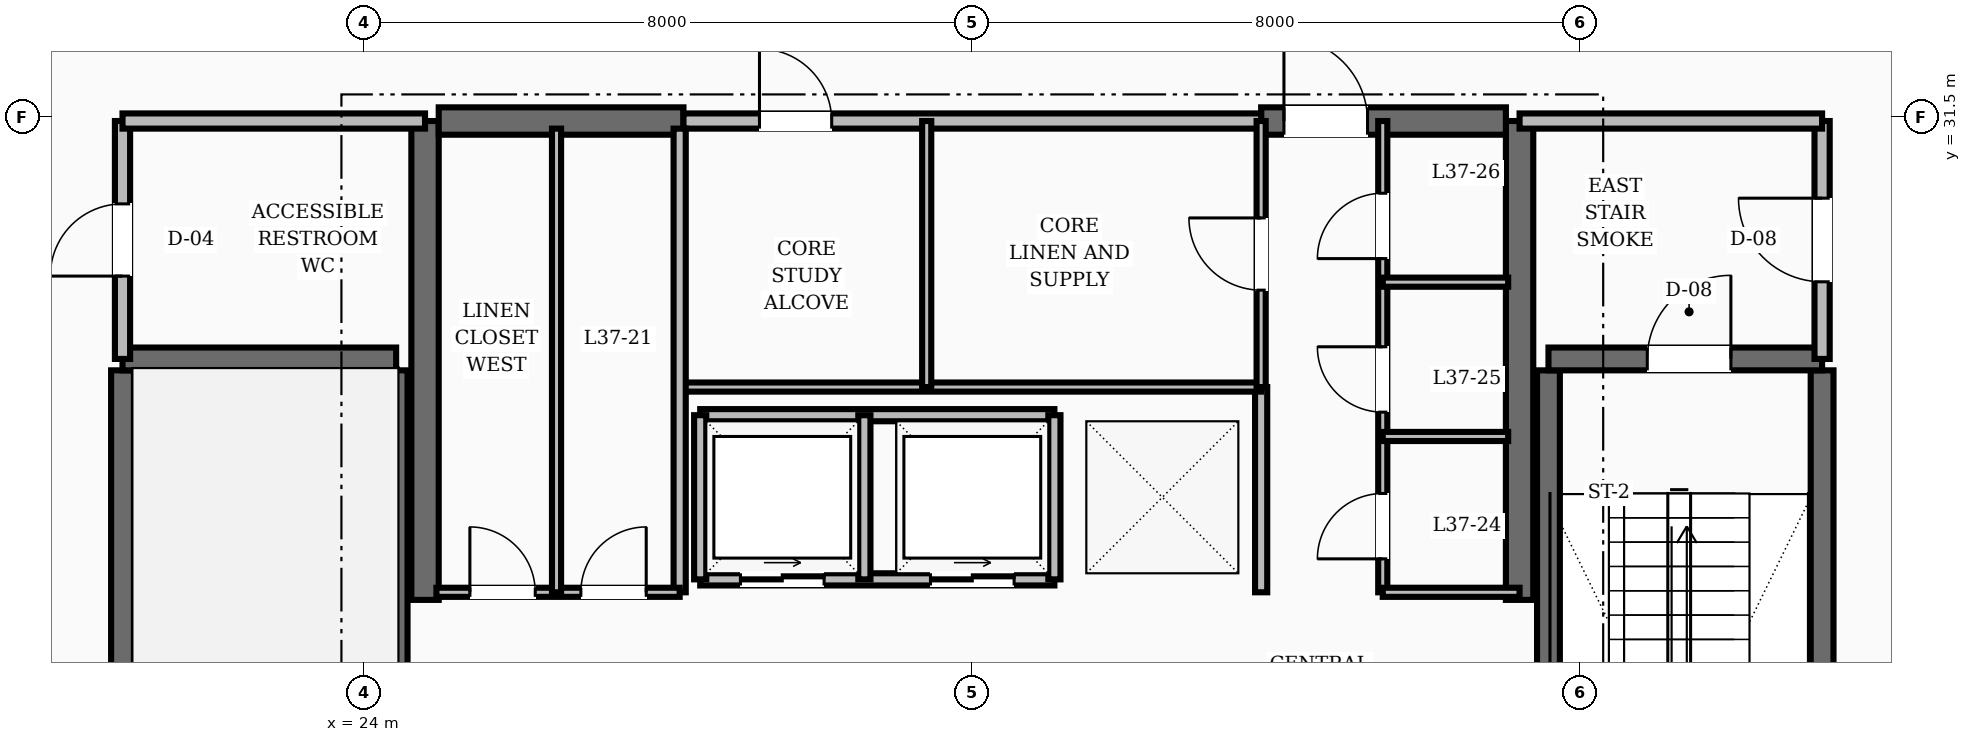
"""IFC4 building model, lengths in metres.
Left out: names, types, materials, properties, quantities, classifications, styles, units other than length and angle.
Written with IfcOpenShell. Run it as: python <this file> out.ifc"""

import sys

from ifc_helpers import new_model, si_unit, direction, frame, frame_2d, origin, place, context, subcontext, project, spatial, rectangle, extrude, element, fill, save


model = new_model("IFC4")
c1 = context("Model", 3, precision=1e-05, world=origin(), true_north=direction((0.0, 1.0)))
c2 = subcontext(c1, "Body", "Model", "MODEL_VIEW")
j1 = project(units=[si_unit("LENGTHUNIT", "METRE"), si_unit("PLANEANGLEUNIT", "RADIAN")], contexts=[c1])
p1 = place(None, origin())
s1 = spatial("IfcSite", under=j1, at=p1, CompositionType="ELEMENT")
p2 = place(p1, origin())
s2 = spatial("IfcBuilding", under=s1, at=p2, CompositionType="ELEMENT")
p3 = place(p2, frame((0.0, 0.0, 146.0)))
s3 = spatial("IfcBuildingStorey", under=s2, at=p3, CompositionType="ELEMENT", Elevation=146.0)
for number, where, z_axis, x_axis in (
    (1, (24.8, 25.15, 0.0), (0.0, 0.0, 1.0), (0.0, 1.0, 0.0)),
    (2, (39.2, 25.15, 0.0), (0.0, 0.0, 1.0), (0.0, 1.0, 0.0)),
):
    element("IfcWall", number, at=place(p3, frame(where, z_axis=z_axis, x_axis=x_axis)), inside=s3, PredefinedType="SHEAR", context=c2, shape_type="SweptSolid", body=[
        extrude(rectangle(XDim=6.3, YDim=0.36, at=frame_2d((3.15, 0.0))), origin(), (0.0, 0.0, 1.0), 3.6),
    ])
p4 = place(p3, frame((24.98, 31.45, 0.0), z_axis=(0.0, 0.0, 1.0), x_axis=(1.0, 0.0, 0.0)))
e3 = element("IfcWall", 3, at=p4, inside=s3, PredefinedType="SHEAR", context=c2, shape_type="SweptSolid", body=[
    extrude(rectangle(XDim=3.22, YDim=0.36, at=frame_2d((1.61, 0.0))), origin(), (0.0, 0.0, 1.0), 3.6),
])
p5 = place(p3, frame((35.8, 31.45, 0.0), z_axis=(0.0, 0.0, 1.0), x_axis=(1.0, 0.0, 0.0)))
e4 = element("IfcWall", 4, at=p5, inside=s3, PredefinedType="SHEAR", context=c2, shape_type="SweptSolid", body=[
    extrude(rectangle(XDim=3.22, YDim=0.36, at=frame_2d((1.61, 0.0))), origin(), (0.0, 0.0, 1.0), 3.6),
])
p6 = place(p5, frame((0.3, 0.0, 0.0)))
e5 = element("IfcOpeningElement", 5, at=p6, cuts=e4, PredefinedType="OPENING", context=c2, shape_type="SweptSolid", body=[
    extrude(rectangle(XDim=1.1, YDim=2.1, at=frame_2d((0.55, 1.05))), frame((0.0, 0.19, 0.0), z_axis=(0.0, -1.0, 0.0), x_axis=(1.0, 0.0, 0.0)), (0.0, 0.0, 1.0), 0.38),
])
for number, where, z_axis, x_axis in (
    (6, (20.82, 19.43, 0.0), (0.0, 0.0, 1.0), (0.0, 1.0, 0.0)),
    (7, (24.42, 19.43, 0.0), (0.0, 0.0, 1.0), (0.0, 1.0, 0.0)),
):
    element("IfcWall", number, at=place(p3, frame(where, z_axis=z_axis, x_axis=x_axis)), inside=s3, PredefinedType="SHEAR", context=c2, shape_type="SweptSolid", body=[
        extrude(rectangle(XDim=8.74, YDim=0.3, at=frame_2d((4.37, 0.0))), origin(), (0.0, 0.0, 1.0), 3.6),
    ])
p7 = place(p3, frame((20.82, 28.32, 0.0), z_axis=(0.0, 0.0, 1.0), x_axis=(1.0, 0.0, 0.0)))
e8 = element("IfcWall", 8, at=p7, inside=s3, PredefinedType="SHEAR", context=c2, shape_type="SweptSolid", body=[
    extrude(rectangle(XDim=3.6, YDim=0.3, at=frame_2d((1.8, 0.0))), origin(), (0.0, 0.0, 1.0), 3.6),
])
for number, where, z_axis, x_axis in (
    (9, (43.18, 19.43, 0.0), (0.0, 0.0, 1.0), (0.0, 1.0, 0.0)),
    (10, (39.58, 19.43, 0.0), (0.0, 0.0, 1.0), (0.0, 1.0, 0.0)),
):
    element("IfcWall", number, at=place(p3, frame(where, z_axis=z_axis, x_axis=x_axis)), inside=s3, PredefinedType="SHEAR", context=c2, shape_type="SweptSolid", body=[
        extrude(rectangle(XDim=8.74, YDim=0.3, at=frame_2d((4.37, 0.0))), origin(), (0.0, 0.0, 1.0), 3.6),
    ])
p8 = place(p3, frame((39.58, 28.32, 0.0), z_axis=(0.0, 0.0, 1.0), x_axis=(1.0, 0.0, 0.0)))
e11 = element("IfcWall", 11, at=p8, inside=s3, PredefinedType="SHEAR", context=c2, shape_type="SweptSolid", body=[
    extrude(rectangle(XDim=3.6, YDim=0.3, at=frame_2d((1.8, 0.0))), origin(), (0.0, 0.0, 1.0), 3.6),
])
p9 = place(p8, frame((1.3, 0.0, 0.0)))
e12 = element("IfcOpeningElement", 12, at=p9, cuts=e11, PredefinedType="OPENING", context=c2, shape_type="SweptSolid", body=[
    extrude(rectangle(XDim=1.1, YDim=2.1, at=frame_2d((0.55, 1.05))), frame((0.0, 0.16, 0.0), z_axis=(0.0, -1.0, 0.0), x_axis=(1.0, 0.0, 0.0)), (0.0, 0.0, 1.0), 0.32),
])
p10 = place(p3, frame((43.18, 28.32, 0.0), z_axis=(0.0, 0.0, 1.0), x_axis=(0.0, 1.0, 0.0)))
e13 = element("IfcWall", 13, at=p10, inside=s3, PredefinedType="SOLIDWALL", context=c2, shape_type="SweptSolid", body=[
    extrude(rectangle(XDim=3.13, YDim=0.2, at=frame_2d((1.565, 0.0))), origin(), (0.0, 0.0, 1.0), 2.8),
])
p11 = place(p10, frame((1.015, 0.0, 0.0)))
e14 = element("IfcOpeningElement", 14, at=p11, cuts=e13, PredefinedType="OPENING", context=c2, shape_type="SweptSolid", body=[
    extrude(rectangle(XDim=1.1, YDim=2.1, at=frame_2d((0.55, 1.05))), frame((0.0, 0.11, 0.0), z_axis=(0.0, -1.0, 0.0), x_axis=(1.0, 0.0, 0.0)), (0.0, 0.0, 1.0), 0.22),
])
p12 = place(p3, frame((39.2, 31.45, 0.0), z_axis=(0.0, 0.0, 1.0), x_axis=(1.0, 0.0, 0.0)))
e15 = element("IfcWall", 15, at=p12, inside=s3, PredefinedType="SOLIDWALL", context=c2, shape_type="SweptSolid", body=[
    extrude(rectangle(XDim=3.98, YDim=0.2, at=frame_2d((1.99, 0.0))), origin(), (0.0, 0.0, 1.0), 2.8),
])
p13 = place(p3, frame((20.82, 28.32, 0.0), z_axis=(0.0, 0.0, 1.0), x_axis=(0.0, 1.0, 0.0)))
e16 = element("IfcWall", 16, at=p13, inside=s3, PredefinedType="SOLIDWALL", context=c2, shape_type="SweptSolid", body=[
    extrude(rectangle(XDim=3.13, YDim=0.2, at=frame_2d((1.565, 0.0))), origin(), (0.0, 0.0, 1.0), 2.8),
])
p14 = place(p13, frame((1.09, 0.0, 0.0)))
e17 = element("IfcOpeningElement", 17, at=p14, cuts=e16, PredefinedType="OPENING", context=c2, shape_type="SweptSolid", body=[
    extrude(rectangle(XDim=0.95, YDim=2.1, at=frame_2d((0.475, 1.05))), frame((0.0, 0.11, 0.0), z_axis=(0.0, -1.0, 0.0), x_axis=(1.0, 0.0, 0.0)), (0.0, 0.0, 1.0), 0.22),
])
p15 = place(p3, frame((20.82, 31.45, 0.0), z_axis=(0.0, 0.0, 1.0), x_axis=(1.0, 0.0, 0.0)))
e18 = element("IfcWall", 18, at=p15, inside=s3, PredefinedType="SOLIDWALL", context=c2, shape_type="SweptSolid", body=[
    extrude(rectangle(XDim=3.98, YDim=0.2, at=frame_2d((1.99, 0.0))), origin(), (0.0, 0.0, 1.0), 2.8),
])
p16 = place(p3, frame((35.8, 25.25, 0.0), z_axis=(0.0, 0.0, 1.0), x_axis=(0.0, 1.0, 0.0)))
e19 = element("IfcWall", 19, at=p16, inside=s3, PredefinedType="SOLIDWALL", context=c2, shape_type="SweptSolid", body=[
    extrude(rectangle(XDim=2.7, YDim=0.16, at=frame_2d((1.35, 0.0))), origin(), (0.0, 0.0, 1.0), 2.8),
])
p17 = place(p3, frame((28.42, 25.42, 0.0), z_axis=(0.0, 0.0, 1.0), x_axis=(1.0, 0.0, 0.0)))
e20 = element("IfcWall", 20, at=p17, inside=s3, PredefinedType="SOLIDWALL", context=c2, shape_type="SweptSolid", body=[
    extrude(rectangle(XDim=4.66, YDim=0.16, at=frame_2d((2.33, 0.0))), origin(), (0.0, 0.0, 1.0), 2.8),
])
p18 = place(p17, frame((0.53, 0.0, 0.0)))
e21 = element("IfcOpeningElement", 21, at=p18, cuts=e20, PredefinedType="OPENING", context=c2, shape_type="SweptSolid", body=[
    extrude(rectangle(XDim=1.1, YDim=2.15, at=frame_2d((0.55, 1.075))), frame((0.0, 0.09, 0.0), z_axis=(0.0, -1.0, 0.0), x_axis=(1.0, 0.0, 0.0)), (0.0, 0.0, 1.0), 0.18),
])
p19 = place(p17, frame((3.03, 0.0, 0.0)))
e22 = element("IfcOpeningElement", 22, at=p19, cuts=e20, PredefinedType="OPENING", context=c2, shape_type="SweptSolid", body=[
    extrude(rectangle(XDim=1.1, YDim=2.15, at=frame_2d((0.55, 1.075))), frame((0.0, 0.09, 0.0), z_axis=(0.0, -1.0, 0.0), x_axis=(1.0, 0.0, 0.0)), (0.0, 0.0, 1.0), 0.18),
])
p20 = place(p3, frame((28.42, 27.58, 0.0), z_axis=(0.0, 0.0, 1.0), x_axis=(1.0, 0.0, 0.0)))
e23 = element("IfcWall", 23, at=p20, inside=s3, PredefinedType="SOLIDWALL", context=c2, shape_type="SweptSolid", body=[
    extrude(rectangle(XDim=4.66, YDim=0.16, at=frame_2d((2.33, 0.0))), origin(), (0.0, 0.0, 1.0), 2.8),
])
for number, where, z_axis, x_axis in (
    (24, (28.42, 25.42, 0.0), (0.0, 0.0, 1.0), (0.0, 1.0, 0.0)),
    (25, (30.58, 25.42, 0.0), (0.0, 0.0, 1.0), (0.0, 1.0, 0.0)),
    (26, (33.08, 25.42, 0.0), (0.0, 0.0, 1.0), (0.0, 1.0, 0.0)),
):
    element("IfcWall", number, at=place(p3, frame(where, z_axis=z_axis, x_axis=x_axis)), inside=s3, PredefinedType="SOLIDWALL", context=c2, shape_type="SweptSolid", body=[
        extrude(rectangle(XDim=2.16, YDim=0.16, at=frame_2d((1.08, 0.0))), origin(), (0.0, 0.0, 1.0), 2.8),
    ])
p21 = place(p3, frame((28.2, 31.45, 0.0), z_axis=(0.0, 0.0, 1.0), x_axis=(1.0, 0.0, 0.0)))
e27 = element("IfcWall", 27, at=p21, inside=s3, PredefinedType="SOLIDWALL", context=c2, shape_type="SweptSolid", body=[
    extrude(rectangle(XDim=7.6, YDim=0.2, at=frame_2d((3.8, 0.0))), origin(), (0.0, 0.0, 1.0), 2.8),
])
p22 = place(p21, frame((1.0, 0.0, 0.0)))
e28 = element("IfcOpeningElement", 28, at=p22, cuts=e27, PredefinedType="OPENING", context=c2, shape_type="SweptSolid", body=[
    extrude(rectangle(XDim=0.95, YDim=2.1, at=frame_2d((0.475, 1.05))), frame((0.0, 0.11, 0.0), z_axis=(0.0, -1.0, 0.0), x_axis=(1.0, 0.0, 0.0)), (0.0, 0.0, 1.0), 0.22),
])
p23 = place(p3, frame((28.2, 27.95, 0.0), z_axis=(0.0, 0.0, 1.0), x_axis=(1.0, 0.0, 0.0)))
e29 = element("IfcWall", 29, at=p23, inside=s3, PredefinedType="PARTITIONING", context=c2, shape_type="SweptSolid", body=[
    extrude(rectangle(XDim=7.6, YDim=0.12, at=frame_2d((3.8, 0.0))), origin(), (0.0, 0.0, 1.0), 2.8),
])
p24 = place(p3, frame((35.8, 27.95, 0.0), z_axis=(0.0, 0.0, 1.0), x_axis=(0.0, 1.0, 0.0)))
e30 = element("IfcWall", 30, at=p24, inside=s3, PredefinedType="PARTITIONING", context=c2, shape_type="SweptSolid", body=[
    extrude(rectangle(XDim=3.5, YDim=0.12, at=frame_2d((1.75, 0.0))), origin(), (0.0, 0.0, 1.0), 2.8),
])
p25 = place(p24, frame((1.275, 0.0, 0.0)))
e31 = element("IfcOpeningElement", 31, at=p25, cuts=e30, PredefinedType="OPENING", context=c2, shape_type="SweptSolid", body=[
    extrude(rectangle(XDim=0.95, YDim=2.1, at=frame_2d((0.475, 1.05))), frame((0.0, 0.07, 0.0), z_axis=(0.0, -1.0, 0.0), x_axis=(1.0, 0.0, 0.0)), (0.0, 0.0, 1.0), 0.14),
])
p26 = place(p3, frame((31.4, 27.95, 0.0), z_axis=(0.0, 0.0, 1.0), x_axis=(0.0, 1.0, 0.0)))
e32 = element("IfcWall", 32, at=p26, inside=s3, PredefinedType="PARTITIONING", context=c2, shape_type="SweptSolid", body=[
    extrude(rectangle(XDim=3.5, YDim=0.12, at=frame_2d((1.75, 0.0))), origin(), (0.0, 0.0, 1.0), 2.8),
])
p27 = place(p3, frame((28.15, 25.25, 0.0), z_axis=(0.0, 0.0, 1.0), x_axis=(0.0, 1.0, 0.0)))
e33 = element("IfcWall", 33, at=p27, inside=s3, PredefinedType="SOLIDWALL", context=c2, shape_type="SweptSolid", body=[
    extrude(rectangle(XDim=6.1, YDim=0.16, at=frame_2d((3.05, 0.0))), origin(), (0.0, 0.0, 1.0), 2.8),
])
p28 = place(p3, frame((24.95, 25.25, 0.0), z_axis=(0.0, 0.0, 1.0), x_axis=(1.0, 0.0, 0.0)))
e34 = element("IfcWall", 34, at=p28, inside=s3, PredefinedType="PARTITIONING", context=c2, shape_type="SweptSolid", body=[
    extrude(rectangle(XDim=3.2, YDim=0.12, at=frame_2d((1.6, 0.0))), origin(), (0.0, 0.0, 1.0), 2.8),
])
p29 = place(p28, frame((0.44, 0.0, 0.0)))
e35 = element("IfcOpeningElement", 35, at=p29, cuts=e34, PredefinedType="OPENING", context=c2, shape_type="SweptSolid", body=[
    extrude(rectangle(XDim=0.86, YDim=2.1, at=frame_2d((0.43, 1.05))), frame((0.0, 0.07, 0.0), z_axis=(0.0, -1.0, 0.0), x_axis=(1.0, 0.0, 0.0)), (0.0, 0.0, 1.0), 0.14),
])
p30 = place(p28, frame((1.9, 0.0, 0.0)))
e36 = element("IfcOpeningElement", 36, at=p30, cuts=e34, PredefinedType="OPENING", context=c2, shape_type="SweptSolid", body=[
    extrude(rectangle(XDim=0.86, YDim=2.1, at=frame_2d((0.43, 1.05))), frame((0.0, 0.07, 0.0), z_axis=(0.0, -1.0, 0.0), x_axis=(1.0, 0.0, 0.0)), (0.0, 0.0, 1.0), 0.14),
])
p31 = place(p3, frame((37.4, 25.25, 0.0), z_axis=(0.0, 0.0, 1.0), x_axis=(0.0, 1.0, 0.0)))
e37 = element("IfcWall", 37, at=p31, inside=s3, PredefinedType="PARTITIONING", context=c2, shape_type="SweptSolid", body=[
    extrude(rectangle(XDim=6.2, YDim=0.12, at=frame_2d((3.1, 0.0))), origin(), (0.0, 0.0, 1.0), 2.8),
])
p32 = place(p31, frame((0.44, 0.0, 0.0)))
e38 = element("IfcOpeningElement", 38, at=p32, cuts=e37, PredefinedType="OPENING", context=c2, shape_type="SweptSolid", body=[
    extrude(rectangle(XDim=0.86, YDim=2.1, at=frame_2d((0.43, 1.05))), frame((0.0, 0.07, 0.0), z_axis=(0.0, -1.0, 0.0), x_axis=(1.0, 0.0, 0.0)), (0.0, 0.0, 1.0), 0.14),
])
p33 = place(p31, frame((2.37, 0.0, 0.0)))
e39 = element("IfcOpeningElement", 39, at=p33, cuts=e37, PredefinedType="OPENING", context=c2, shape_type="SweptSolid", body=[
    extrude(rectangle(XDim=0.86, YDim=2.1, at=frame_2d((0.43, 1.05))), frame((0.0, 0.07, 0.0), z_axis=(0.0, -1.0, 0.0), x_axis=(1.0, 0.0, 0.0)), (0.0, 0.0, 1.0), 0.14),
])
p34 = place(p31, frame((4.39, 0.0, 0.0)))
e40 = element("IfcOpeningElement", 40, at=p34, cuts=e37, PredefinedType="OPENING", context=c2, shape_type="SweptSolid", body=[
    extrude(rectangle(XDim=0.86, YDim=2.1, at=frame_2d((0.43, 1.05))), frame((0.0, 0.07, 0.0), z_axis=(0.0, -1.0, 0.0), x_axis=(1.0, 0.0, 0.0)), (0.0, 0.0, 1.0), 0.14),
])
p35 = place(p3, frame((37.4, 25.25, 0.0), z_axis=(0.0, 0.0, 1.0), x_axis=(1.0, 0.0, 0.0)))
e41 = element("IfcWall", 41, at=p35, inside=s3, PredefinedType="PARTITIONING", context=c2, shape_type="SweptSolid", body=[
    extrude(rectangle(XDim=1.8, YDim=0.12, at=frame_2d((0.9, 0.0))), origin(), (0.0, 0.0, 1.0), 2.8),
])
p36 = place(p3, frame((26.53, 25.25, 0.0), z_axis=(0.0, 0.0, 1.0), x_axis=(0.0, 1.0, 0.0)))
e42 = element("IfcWall", 42, at=p36, inside=s3, PredefinedType="PARTITIONING", context=c2, shape_type="SweptSolid", body=[
    extrude(rectangle(XDim=6.1, YDim=0.12, at=frame_2d((3.05, 0.0))), origin(), (0.0, 0.0, 1.0), 2.8),
])
for number, where, z_axis, x_axis in (
    (43, (37.4, 27.3, 0.0), (0.0, 0.0, 1.0), (1.0, 0.0, 0.0)),
    (44, (37.4, 29.33, 0.0), (0.0, 0.0, 1.0), (1.0, 0.0, 0.0)),
):
    element("IfcWall", number, at=place(p3, frame(where, z_axis=z_axis, x_axis=x_axis)), inside=s3, PredefinedType="PARTITIONING", context=c2, shape_type="SweptSolid", body=[
        extrude(rectangle(XDim=1.65, YDim=0.12, at=frame_2d((0.825, 0.0))), origin(), (0.0, 0.0, 1.0), 2.8),
    ])
p37 = place(p9, origin())
e45 = element("IfcDoor", 45, at=p37, inside=s3, OperationType="SINGLE_SWING_RIGHT", PredefinedType="DOOR", context=c2, shape_type="SweptSolid", body=[
    extrude(rectangle(XDim=1.1, YDim=2.1, at=frame_2d((0.55, 1.05))), frame((0.0, 0.025, 0.0), z_axis=(0.0, -1.0, 0.0), x_axis=(1.0, 0.0, 0.0)), (0.0, 0.0, 1.0), 0.05),
])
fill(e12, e45)
p38 = place(p11, origin())
e46 = element("IfcDoor", 46, at=p38, inside=s3, OperationType="SINGLE_SWING_RIGHT", PredefinedType="DOOR", context=c2, shape_type="SweptSolid", body=[
    extrude(rectangle(XDim=1.1, YDim=2.1, at=frame_2d((0.55, 1.05))), frame((0.0, 0.025, 0.0), z_axis=(0.0, -1.0, 0.0), x_axis=(1.0, 0.0, 0.0)), (0.0, 0.0, 1.0), 0.05),
])
fill(e14, e46)
p39 = place(p14, origin())
e47 = element("IfcDoor", 47, at=p39, inside=s3, OperationType="SINGLE_SWING_LEFT", PredefinedType="DOOR", context=c2, shape_type="SweptSolid", body=[
    extrude(rectangle(XDim=0.95, YDim=2.1, at=frame_2d((0.475, 1.05))), frame((0.0, 0.025, 0.0), z_axis=(0.0, -1.0, 0.0), x_axis=(1.0, 0.0, 0.0)), (0.0, 0.0, 1.0), 0.05),
])
fill(e17, e47)
p40 = place(p6, origin())
e48 = element("IfcDoor", 48, at=p40, inside=s3, OperationType="SINGLE_SWING_LEFT", PredefinedType="DOOR", context=c2, shape_type="SweptSolid", body=[
    extrude(rectangle(XDim=1.1, YDim=2.1, at=frame_2d((0.55, 1.05))), frame((0.0, 0.025, 0.0), z_axis=(0.0, -1.0, 0.0), x_axis=(1.0, 0.0, 0.0)), (0.0, 0.0, 1.0), 0.05),
])
fill(e5, e48)
p41 = place(p18, origin())
e49 = element("IfcDoor", 49, at=p41, inside=s3, OperationType="SLIDING_TO_RIGHT", PredefinedType="DOOR", context=c2, shape_type="SweptSolid", body=[
    extrude(rectangle(XDim=1.1, YDim=2.15, at=frame_2d((0.55, 1.075))), frame((0.0, 0.025, 0.0), z_axis=(0.0, -1.0, 0.0), x_axis=(1.0, 0.0, 0.0)), (0.0, 0.0, 1.0), 0.05),
])
fill(e21, e49)
p42 = place(p19, origin())
e50 = element("IfcDoor", 50, at=p42, inside=s3, OperationType="SLIDING_TO_RIGHT", PredefinedType="DOOR", context=c2, shape_type="SweptSolid", body=[
    extrude(rectangle(XDim=1.1, YDim=2.15, at=frame_2d((0.55, 1.075))), frame((0.0, 0.025, 0.0), z_axis=(0.0, -1.0, 0.0), x_axis=(1.0, 0.0, 0.0)), (0.0, 0.0, 1.0), 0.05),
])
fill(e22, e50)
p43 = place(p22, origin())
e51 = element("IfcDoor", 51, at=p43, inside=s3, OperationType="SINGLE_SWING_LEFT", PredefinedType="DOOR", context=c2, shape_type="SweptSolid", body=[
    extrude(rectangle(XDim=0.95, YDim=2.1, at=frame_2d((0.475, 1.05))), frame((0.0, 0.025, 0.0), z_axis=(0.0, -1.0, 0.0), x_axis=(1.0, 0.0, 0.0)), (0.0, 0.0, 1.0), 0.05),
])
fill(e28, e51)
p44 = place(p25, origin())
e52 = element("IfcDoor", 52, at=p44, inside=s3, OperationType="SINGLE_SWING_RIGHT", PredefinedType="DOOR", context=c2, shape_type="SweptSolid", body=[
    extrude(rectangle(XDim=0.95, YDim=2.1, at=frame_2d((0.475, 1.05))), frame((0.0, 0.025, 0.0), z_axis=(0.0, -1.0, 0.0), x_axis=(1.0, 0.0, 0.0)), (0.0, 0.0, 1.0), 0.05),
])
fill(e31, e52)
p45 = place(p29, origin())
e53 = element("IfcDoor", 53, at=p45, inside=s3, OperationType="SINGLE_SWING_LEFT", PredefinedType="DOOR", context=c2, shape_type="SweptSolid", body=[
    extrude(rectangle(XDim=0.86, YDim=2.1, at=frame_2d((0.43, 1.05))), frame((0.0, 0.025, 0.0), z_axis=(0.0, -1.0, 0.0), x_axis=(1.0, 0.0, 0.0)), (0.0, 0.0, 1.0), 0.05),
])
fill(e35, e53)
p46 = place(p30, origin())
e54 = element("IfcDoor", 54, at=p46, inside=s3, OperationType="SINGLE_SWING_RIGHT", PredefinedType="DOOR", context=c2, shape_type="SweptSolid", body=[
    extrude(rectangle(XDim=0.86, YDim=2.1, at=frame_2d((0.43, 1.05))), frame((0.0, 0.025, 0.0), z_axis=(0.0, -1.0, 0.0), x_axis=(1.0, 0.0, 0.0)), (0.0, 0.0, 1.0), 0.05),
])
fill(e36, e54)
p47 = place(p32, origin())
e55 = element("IfcDoor", 55, at=p47, inside=s3, OperationType="SINGLE_SWING_LEFT", PredefinedType="DOOR", context=c2, shape_type="SweptSolid", body=[
    extrude(rectangle(XDim=0.86, YDim=2.1, at=frame_2d((0.43, 1.05))), frame((0.0, 0.025, 0.0), z_axis=(0.0, -1.0, 0.0), x_axis=(1.0, 0.0, 0.0)), (0.0, 0.0, 1.0), 0.05),
])
fill(e38, e55)
p48 = place(p33, origin())
e56 = element("IfcDoor", 56, at=p48, inside=s3, OperationType="SINGLE_SWING_RIGHT", PredefinedType="DOOR", context=c2, shape_type="SweptSolid", body=[
    extrude(rectangle(XDim=0.86, YDim=2.1, at=frame_2d((0.43, 1.05))), frame((0.0, 0.025, 0.0), z_axis=(0.0, -1.0, 0.0), x_axis=(1.0, 0.0, 0.0)), (0.0, 0.0, 1.0), 0.05),
])
fill(e39, e56)
p49 = place(p34, origin())
e57 = element("IfcDoor", 57, at=p49, inside=s3, OperationType="SINGLE_SWING_LEFT", PredefinedType="DOOR", context=c2, shape_type="SweptSolid", body=[
    extrude(rectangle(XDim=0.86, YDim=2.1, at=frame_2d((0.43, 1.05))), frame((0.0, 0.025, 0.0), z_axis=(0.0, -1.0, 0.0), x_axis=(1.0, 0.0, 0.0)), (0.0, 0.0, 1.0), 0.05),
])
fill(e40, e57)
save(model, sys.argv[1])
